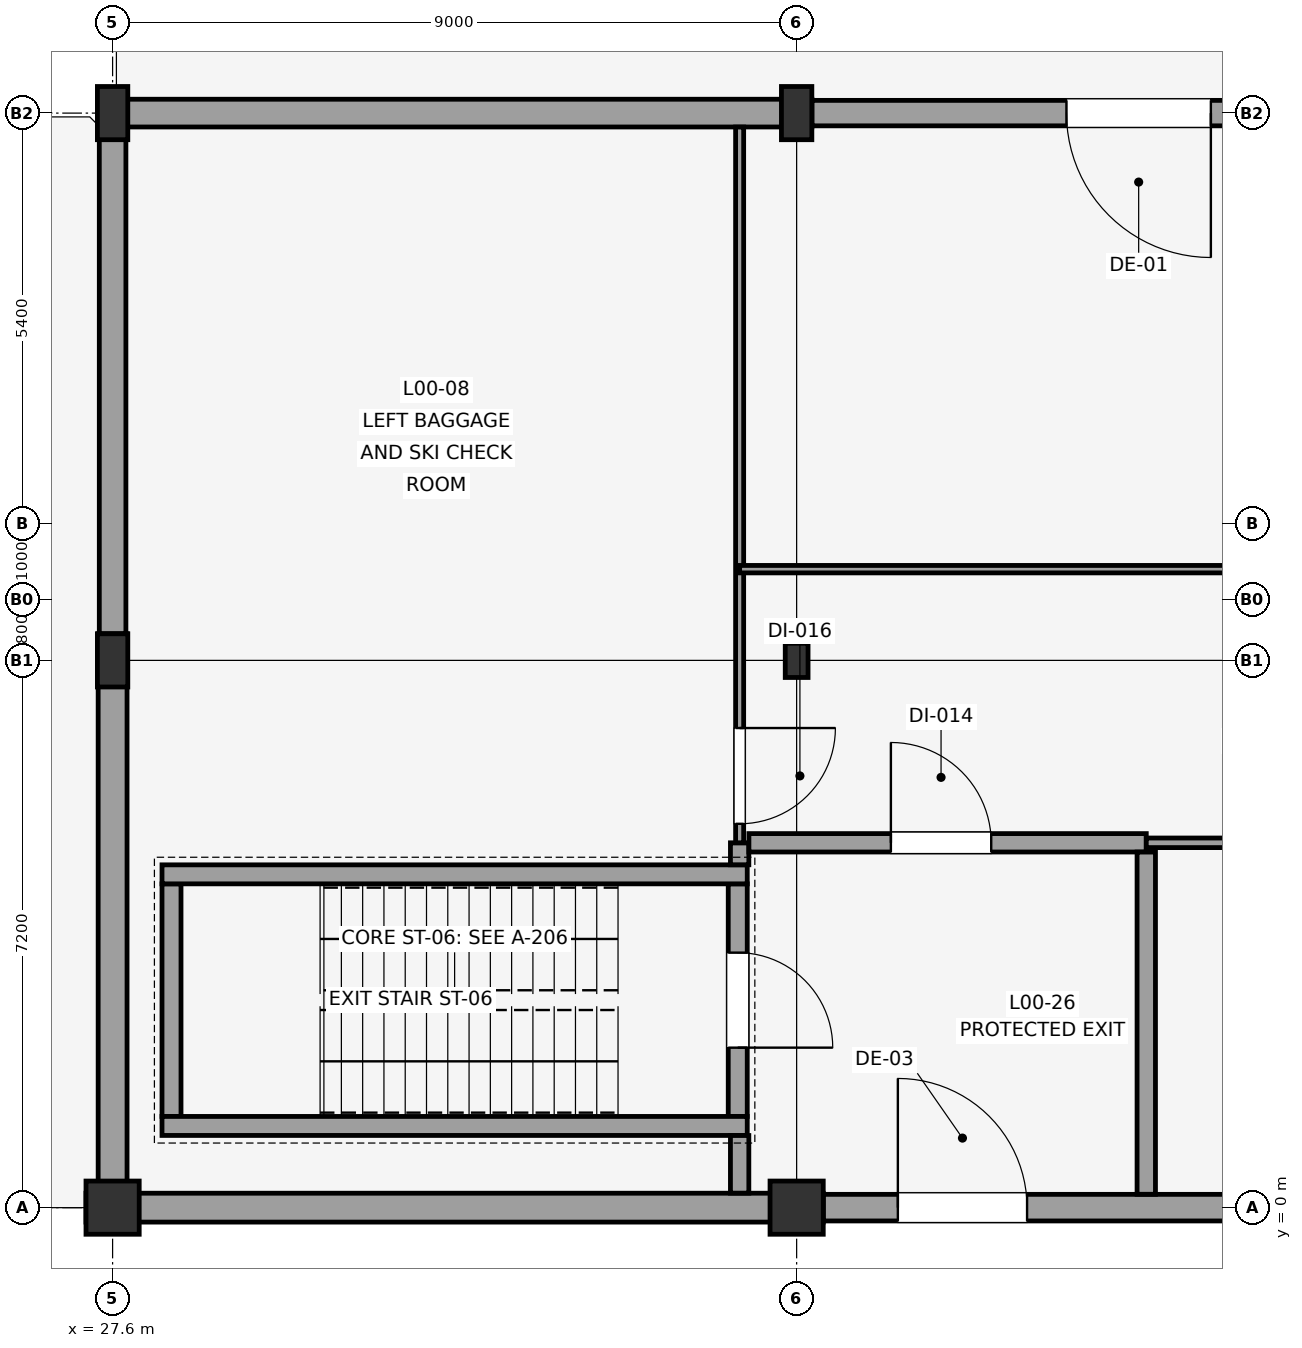
"""IFC4 building model, lengths in metres.
Left out: names, types, materials, properties, quantities, classifications, styles, units other than length and angle.
Written with IfcOpenShell. Run it as: python <this file> out.ifc"""

import sys

from ifc_helpers import new_model, si_unit, direction, frame, frame_2d, origin, origin_2d, place, context, subcontext, project, spatial, rectangle, circle, i_section, extrude, element, fill, save


model = new_model("IFC4")
c1 = context("Model", 3, precision=1e-05, world=origin(), true_north=direction((0.0, 1.0)))
c2 = subcontext(c1, "Body", "Model", "MODEL_VIEW")
j1 = project(units=[si_unit("LENGTHUNIT", "METRE"), si_unit("PLANEANGLEUNIT", "RADIAN")], contexts=[c1])
p1 = place(None, origin())
s1 = spatial("IfcSite", under=j1, at=p1, CompositionType="ELEMENT")
p2 = place(p1, origin())
s2 = spatial("IfcBuilding", under=s1, at=p2, CompositionType="ELEMENT")
p3 = place(p2, origin())
s3 = spatial("IfcBuildingStorey", under=s2, at=p3, CompositionType="ELEMENT", Elevation=0.0)
p4 = place(p3, frame((27.6, 0.0, 0.0), z_axis=(0.0, 0.0, 1.0), x_axis=(1.0, 0.0, 0.0)))
e1 = element("IfcColumn", 1, at=p4, inside=s3, PredefinedType="COLUMN", context=c2, shape_type="SweptSolid", body=[
    extrude(circle(Radius=0.35, at=origin_2d()), origin(), (0.0, 0.0, 1.0), 4.5),
])
for number, where, z_axis, x_axis in (
    (2, (27.6, 7.2, 0.0), (0.0, 0.0, 1.0), (1.0, 0.0, 0.0)),
    (3, (27.6, 14.4, 0.0), (0.0, 0.0, 1.0), (1.0, 0.0, 0.0)),
):
    element("IfcColumn", number, at=place(p3, frame(where, z_axis=z_axis, x_axis=x_axis)), inside=s3, PredefinedType="COLUMN", context=c2, shape_type="SweptSolid", body=[
        extrude(rectangle(XDim=0.4, YDim=0.7, at=origin_2d()), origin(), (0.0, 0.0, 1.0), 4.5),
    ])
p5 = place(p3, frame((36.6, 0.0, 0.0), z_axis=(0.0, 0.0, 1.0), x_axis=(1.0, 0.0, 0.0)))
e4 = element("IfcColumn", 4, at=p5, inside=s3, PredefinedType="COLUMN", context=c2, shape_type="SweptSolid", body=[
    extrude(circle(Radius=0.35, at=origin_2d()), origin(), (0.0, 0.0, 1.0), 4.5),
])
p6 = place(p3, frame((36.6, 7.2, 0.0), z_axis=(0.0, 0.0, 1.0), x_axis=(1.0, 0.0, 0.0)))
e5 = element("IfcColumn", 5, at=p6, inside=s3, PredefinedType="COLUMN", context=c2, shape_type="SweptSolid", body=[
    extrude(i_section(OverallWidth=0.3, OverallDepth=0.45, WebThickness=0.011, FlangeThickness=0.021, FilletRadius=0.027, at=origin_2d()), origin(), (0.0, 0.0, 1.0), 4.5),
])
p7 = place(p3, frame((36.6, 14.4, 0.0), z_axis=(0.0, 0.0, 1.0), x_axis=(1.0, 0.0, 0.0)))
e6 = element("IfcColumn", 6, at=p7, inside=s3, PredefinedType="COLUMN", context=c2, shape_type="SweptSolid", body=[
    extrude(rectangle(XDim=0.4, YDim=0.7, at=origin_2d()), origin(), (0.0, 0.0, 1.0), 4.5),
])
p8 = place(p3, frame((27.25, 0.0, 0.0), z_axis=(0.0, 0.0, 1.0), x_axis=(1.0, 0.0, 0.0)))
e7 = element("IfcWall", 7, at=p8, inside=s3, PredefinedType="SOLIDWALL", context=c2, shape_type="SweptSolid", body=[
    extrude(rectangle(XDim=9.7, YDim=0.38, at=frame_2d((4.85, 0.0))), origin(), (0.0, 0.0, 1.0), 3.12),
])
p9 = place(p3, frame((36.8, 14.4, 0.0), z_axis=(0.0, 0.0, 1.0), x_axis=(-1.0, 0.0, 0.0)))
e8 = element("IfcWall", 8, at=p9, inside=s3, PredefinedType="SOLIDWALL", context=c2, shape_type="SweptSolid", body=[
    extrude(rectangle(XDim=9.4, YDim=0.365, at=frame_2d((4.7, 0.0))), origin(), (0.0, 0.0, 1.0), 3.12),
])
p10 = place(p3, frame((36.951, 0.0, 0.0), z_axis=(0.0, 0.0, 1.0), x_axis=(1.0, 0.0, 0.0)))
e9 = element("IfcWall", 9, at=p10, inside=s3, PredefinedType="SOLIDWALL", context=c2, shape_type="SweptSolid", body=[
    extrude(rectangle(XDim=8.999, YDim=0.35, at=frame_2d((4.5, 0.0))), origin(), (0.0, 0.0, 1.0), 3.12),
])
p11 = place(p10, frame((0.981, 0.0, 0.0)))
e10 = element("IfcOpeningElement", 10, at=p11, cuts=e9, PredefinedType="OPENING", context=c2, shape_type="SweptSolid", body=[
    extrude(rectangle(XDim=1.7, YDim=2.35, at=frame_2d((0.85, 1.175))), frame((0.0, 0.185, 0.0), z_axis=(0.0, -1.0, 0.0), x_axis=(1.0, 0.0, 0.0)), (0.0, 0.0, 1.0), 0.37),
])
p12 = place(p3, frame((45.8, 14.4, 0.0), z_axis=(0.0, 0.0, 1.0), x_axis=(-1.0, 0.0, 0.0)))
e11 = element("IfcWall", 11, at=p12, inside=s3, PredefinedType="SOLIDWALL", context=c2, shape_type="SweptSolid", body=[
    extrude(rectangle(XDim=8.999, YDim=0.335, at=frame_2d((4.5, 0.0))), origin(), (0.0, 0.0, 1.0), 3.12),
])
p13 = place(p12, frame((3.75, 0.0, 0.0)))
e12 = element("IfcOpeningElement", 12, at=p13, cuts=e11, PredefinedType="OPENING", context=c2, shape_type="SweptSolid", body=[
    extrude(rectangle(XDim=1.9, YDim=2.4, at=frame_2d((0.95, 1.2))), frame((0.0, 0.177, 0.0), z_axis=(0.0, -1.0, 0.0), x_axis=(1.0, 0.0, 0.0)), (0.0, 0.0, 1.0), 0.355),
])
p14 = place(p3, frame((27.6, 7.55, 0.0), z_axis=(0.0, 0.0, 1.0), x_axis=(0.0, -1.0, 0.0)))
e13 = element("IfcWall", 13, at=p14, inside=s3, PredefinedType="SOLIDWALL", context=c2, shape_type="SweptSolid", body=[
    extrude(rectangle(XDim=7.359, YDim=0.38, at=frame_2d((3.68, 0.0))), origin(), (0.0, 0.0, 1.0), 3.12),
])
p15 = place(p3, frame((27.6, 14.217, 0.0), z_axis=(0.0, 0.0, 1.0), x_axis=(0.0, -1.0, 0.0)))
e14 = element("IfcWall", 14, at=p15, inside=s3, PredefinedType="SOLIDWALL", context=c2, shape_type="SweptSolid", body=[
    extrude(rectangle(XDim=6.666, YDim=0.35, at=frame_2d((3.333, 0.0))), origin(), (0.0, 0.0, 1.0), 3.12),
])
p16 = place(p3, frame((35.825, 4.26, 0.0), z_axis=(0.0, 0.0, 1.0), x_axis=(0.0, -1.0, 0.0)))
e15 = element("IfcWall", 15, at=p16, inside=s3, PredefinedType="SHEAR", context=c2, shape_type="SweptSolid", body=[
    extrude(rectangle(XDim=3.06, YDim=0.25, at=frame_2d((1.53, 0.0))), origin(), (0.0, 0.0, 1.0), 4.5),
])
p17 = place(p16, frame((0.905, 0.0, 0.0)))
e16 = element("IfcOpeningElement", 16, at=p17, cuts=e15, PredefinedType="OPENING", context=c2, shape_type="SweptSolid", body=[
    extrude(rectangle(XDim=1.25, YDim=2.15, at=frame_2d((0.625, 1.075))), frame((0.0, 0.135, 0.0), z_axis=(0.0, -1.0, 0.0), x_axis=(1.0, 0.0, 0.0)), (0.0, 0.0, 1.0), 0.27),
])
p18 = place(p3, frame((28.375, 4.26, 0.0), z_axis=(0.0, 0.0, 1.0), x_axis=(0.0, -1.0, 0.0)))
e17 = element("IfcWall", 17, at=p18, inside=s3, PredefinedType="SHEAR", context=c2, shape_type="SweptSolid", body=[
    extrude(rectangle(XDim=3.06, YDim=0.25, at=frame_2d((1.53, 0.0))), origin(), (0.0, 0.0, 1.0), 4.5),
])
for number, where, z_axis, x_axis in (
    (18, (35.95, 4.385, 0.0), (0.0, 0.0, 1.0), (-1.0, 0.0, 0.0)),
    (19, (35.95, 1.075, 0.0), (0.0, 0.0, 1.0), (-1.0, 0.0, 0.0)),
):
    element("IfcWall", number, at=place(p3, frame(where, z_axis=z_axis, x_axis=x_axis)), inside=s3, PredefinedType="SHEAR", context=c2, shape_type="SweptSolid", body=[
        extrude(rectangle(XDim=7.7, YDim=0.25, at=frame_2d((3.85, 0.0))), origin(), (0.0, 0.0, 1.0), 4.5),
    ])
p19 = place(p3, frame((35.85, 0.191, 0.0), z_axis=(0.0, 0.0, 1.0), x_axis=(0.0, 1.0, 0.0)))
e20 = element("IfcWall", 20, at=p19, inside=s3, PredefinedType="SOLIDWALL", context=c2, shape_type="SweptSolid", body=[
    extrude(rectangle(XDim=0.758, YDim=0.242, at=frame_2d((0.379, 0.0))), origin(), (0.0, 0.0, 1.0), 2.7),
])
p20 = place(p3, frame((35.85, 4.511, 0.0), z_axis=(0.0, 0.0, 1.0), x_axis=(0.0, 1.0, 0.0)))
e21 = element("IfcWall", 21, at=p20, inside=s3, PredefinedType="SOLIDWALL", context=c2, shape_type="SweptSolid", body=[
    extrude(rectangle(XDim=0.289, YDim=0.242, at=frame_2d((0.145, 0.0))), origin(), (0.0, 0.0, 1.0), 2.7),
])
p21 = place(p3, frame((35.972, 4.8, 0.0), z_axis=(0.0, 0.0, 1.0), x_axis=(1.0, 0.0, 0.0)))
e22 = element("IfcWall", 22, at=p21, inside=s3, PredefinedType="SOLIDWALL", context=c2, shape_type="SweptSolid", body=[
    extrude(rectangle(XDim=5.228, YDim=0.242, at=frame_2d((2.614, 0.0))), origin(), (0.0, 0.0, 1.0), 2.7),
])
p22 = place(p21, frame((1.868, 0.0, 0.0)))
e23 = element("IfcOpeningElement", 23, at=p22, cuts=e22, PredefinedType="OPENING", context=c2, shape_type="SweptSolid", body=[
    extrude(rectangle(XDim=1.32, YDim=2.2, at=frame_2d((0.66, 1.1))), frame((0.0, 0.131, 0.0), z_axis=(0.0, -1.0, 0.0), x_axis=(1.0, 0.0, 0.0)), (0.0, 0.0, 1.0), 0.262),
])
p23 = place(p3, frame((41.2, 4.678, 0.0), z_axis=(0.0, 0.0, 1.0), x_axis=(0.0, -1.0, 0.0)))
e24 = element("IfcWall", 24, at=p23, inside=s3, PredefinedType="SOLIDWALL", context=c2, shape_type="SweptSolid", body=[
    extrude(rectangle(XDim=4.502, YDim=0.242, at=frame_2d((2.251, 0.0))), origin(), (0.0, 0.0, 1.0), 2.7),
])
p24 = place(p3, frame((41.2, 4.8, 0.0), z_axis=(0.0, 0.0, 1.0), x_axis=(1.0, 0.0, 0.0)))
e25 = element("IfcWall", 25, at=p24, inside=s3, PredefinedType="MOVABLE", context=c2, shape_type="SweptSolid", body=[
    extrude(rectangle(XDim=16.8, YDim=0.126, at=frame_2d((8.4, 0.0))), origin(), (0.0, 0.0, 1.0), 2.7),
])
p25 = place(p24, frame((8.36, 0.0, 0.0)))
e26 = element("IfcOpeningElement", 26, at=p25, cuts=e25, PredefinedType="OPENING", context=c2, shape_type="SweptSolid", body=[
    extrude(rectangle(XDim=1.08, YDim=2.15, at=frame_2d((0.54, 1.075))), frame((0.0, 0.073, 0.0), z_axis=(0.0, -1.0, 0.0), x_axis=(1.0, 0.0, 0.0)), (0.0, 0.0, 1.0), 0.146),
])
p26 = place(p3, frame((35.85, 14.217, 0.0), z_axis=(0.0, 0.0, 1.0), x_axis=(0.0, -1.0, 0.0)))
e27 = element("IfcWall", 27, at=p26, inside=s3, PredefinedType="PARTITIONING", context=c2, shape_type="SweptSolid", body=[
    extrude(rectangle(XDim=9.417, YDim=0.106, at=frame_2d((4.708, 0.0))), origin(), (0.0, 0.0, 1.0), 2.7),
])
p27 = place(p26, frame((7.906, 0.0, 0.0)))
e28 = element("IfcOpeningElement", 28, at=p27, cuts=e27, PredefinedType="OPENING", context=c2, shape_type="SweptSolid", body=[
    extrude(rectangle(XDim=1.26, YDim=2.18, at=frame_2d((0.63, 1.09))), frame((0.0, 0.063, 0.0), z_axis=(0.0, -1.0, 0.0), x_axis=(1.0, 0.0, 0.0)), (0.0, 0.0, 1.0), 0.126),
])
p28 = place(p3, frame((54.6, 8.4, 0.0), z_axis=(0.0, 0.0, 1.0), x_axis=(-1.0, 0.0, 0.0)))
e29 = element("IfcWall", 29, at=p28, inside=s3, PredefinedType="PARTITIONING", context=c2, shape_type="SweptSolid", body=[
    extrude(rectangle(XDim=18.75, YDim=0.098, at=frame_2d((9.375, 0.0))), origin(), (0.0, 0.0, 1.0), 2.7),
])
p29 = place(p28, frame((4.06, 0.0, 0.0)))
e30 = element("IfcOpeningElement", 30, at=p29, cuts=e29, PredefinedType="OPENING", context=c2, shape_type="SweptSolid", body=[
    extrude(rectangle(XDim=1.48, YDim=2.2, at=frame_2d((0.74, 1.1))), frame((0.0, 0.059, 0.0), z_axis=(0.0, -1.0, 0.0), x_axis=(1.0, 0.0, 0.0)), (0.0, 0.0, 1.0), 0.118),
])
p30 = place(p11, origin())
e31 = element("IfcDoor", 31, at=p30, inside=s3, OperationType="DOUBLE_SWING_LEFT", PredefinedType="DOOR", context=c2, shape_type="SweptSolid", body=[
    extrude(rectangle(XDim=1.7, YDim=2.35, at=frame_2d((0.85, 1.175))), frame((0.0, 0.025, 0.0), z_axis=(0.0, -1.0, 0.0), x_axis=(1.0, 0.0, 0.0)), (0.0, 0.0, 1.0), 0.05),
])
fill(e10, e31)
p31 = place(p13, origin())
e32 = element("IfcDoor", 32, at=p31, inside=s3, OperationType="DOUBLE_SWING_LEFT", PredefinedType="DOOR", context=c2, shape_type="SweptSolid", body=[
    extrude(rectangle(XDim=1.9, YDim=2.4, at=frame_2d((0.95, 1.2))), frame((0.0, 0.025, 0.0), z_axis=(0.0, -1.0, 0.0), x_axis=(1.0, 0.0, 0.0)), (0.0, 0.0, 1.0), 0.05),
])
fill(e12, e32)
p32 = place(p17, origin())
e33 = element("IfcDoor", 33, at=p32, inside=s3, OperationType="SINGLE_SWING_RIGHT", PredefinedType="DOOR", context=c2, shape_type="SweptSolid", body=[
    extrude(rectangle(XDim=1.25, YDim=2.15, at=frame_2d((0.625, 1.075))), frame((0.0, 0.025, 0.0), z_axis=(0.0, -1.0, 0.0), x_axis=(1.0, 0.0, 0.0)), (0.0, 0.0, 1.0), 0.05),
])
fill(e16, e33)
p33 = place(p22, origin())
e34 = element("IfcDoor", 34, at=p33, inside=s3, OperationType="SINGLE_SWING_LEFT", PredefinedType="DOOR", context=c2, shape_type="SweptSolid", body=[
    extrude(rectangle(XDim=1.32, YDim=2.2, at=frame_2d((0.66, 1.1))), frame((0.0, 0.025, 0.0), z_axis=(0.0, -1.0, 0.0), x_axis=(1.0, 0.0, 0.0)), (0.0, 0.0, 1.0), 0.05),
])
fill(e23, e34)
p34 = place(p27, origin())
e35 = element("IfcDoor", 35, at=p34, inside=s3, OperationType="SINGLE_SWING_LEFT", PredefinedType="DOOR", context=c2, shape_type="SweptSolid", body=[
    extrude(rectangle(XDim=1.26, YDim=2.18, at=frame_2d((0.63, 1.09))), frame((0.0, 0.025, 0.0), z_axis=(0.0, -1.0, 0.0), x_axis=(1.0, 0.0, 0.0)), (0.0, 0.0, 1.0), 0.05),
])
fill(e28, e35)
save(model, sys.argv[1])
